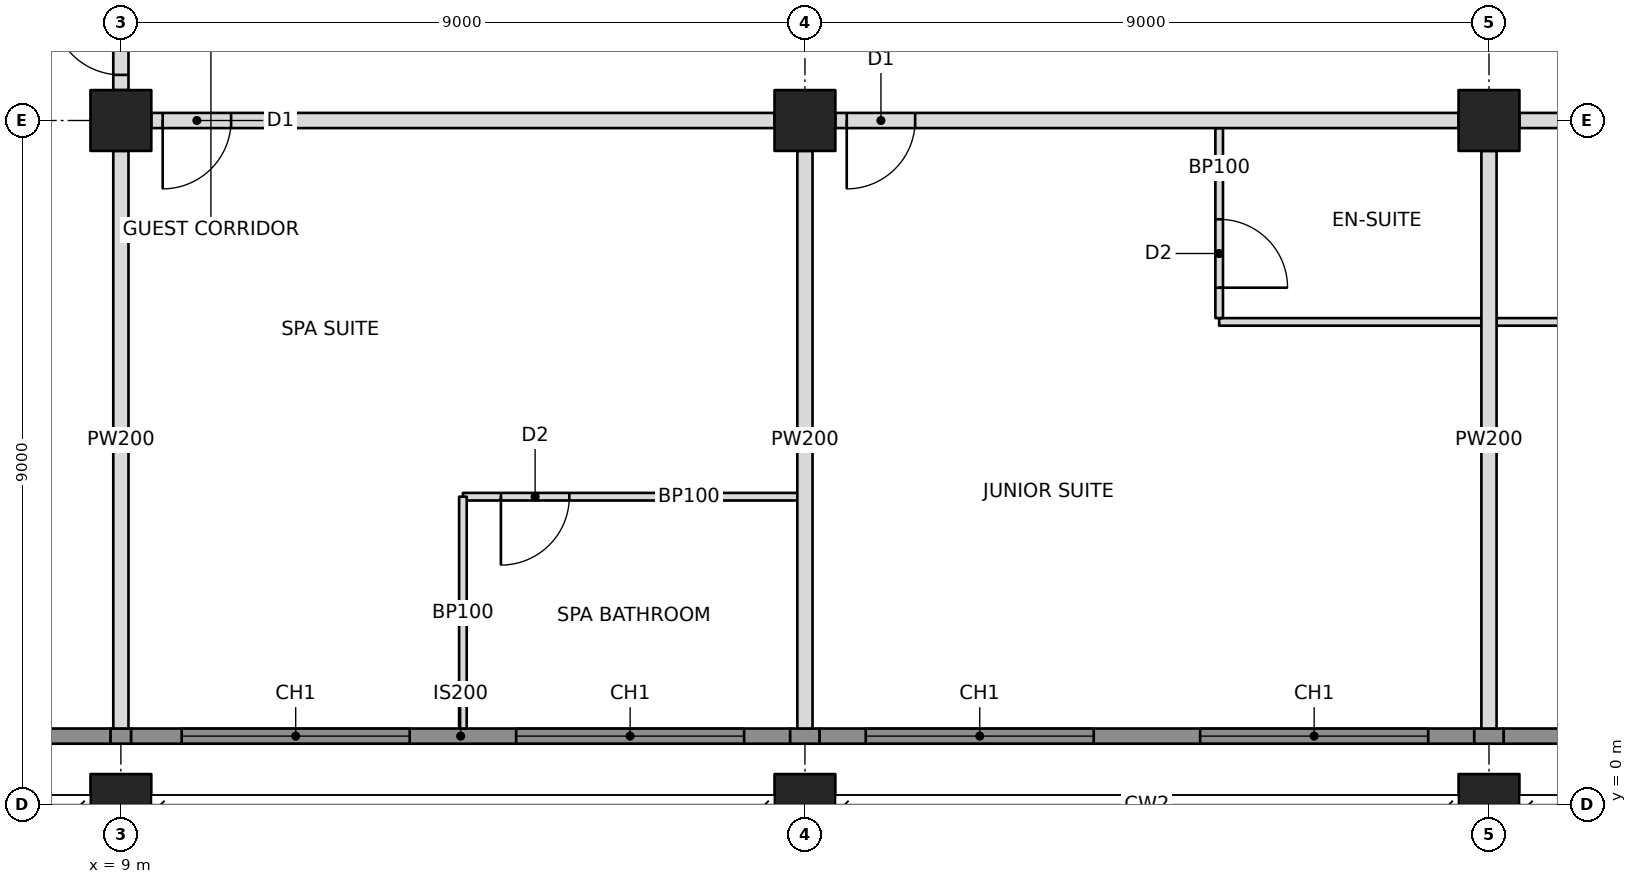
"""IFC4 building model, lengths in metres.
Left out: names, types, materials, properties, quantities, classifications, styles, units other than length and angle.
Written with IfcOpenShell. Run it as: python <this file> out.ifc"""

import sys

from ifc_helpers import new_model, si_unit, direction, frame, frame_2d, origin, origin_2d, place, context, subcontext, project, spatial, rectangle, hollow_rectangle, extrude, element, fill, save


model = new_model("IFC4")
c1 = context("Model", 3, precision=1e-05, world=origin(), true_north=direction((0.0, 1.0)))
c2 = subcontext(c1, "Body", "Model", "MODEL_VIEW")
j1 = project(units=[si_unit("LENGTHUNIT", "METRE"), si_unit("PLANEANGLEUNIT", "RADIAN")], contexts=[c1])
p1 = place(None, origin())
s1 = spatial("IfcSite", under=j1, at=p1, CompositionType="ELEMENT")
p2 = place(p1, origin())
s2 = spatial("IfcBuilding", under=s1, at=p2, CompositionType="ELEMENT")
p3 = place(p2, frame((0.0, 0.0, 244.6)))
s3 = spatial("IfcBuildingStorey", under=s2, at=p3, CompositionType="ELEMENT", Elevation=244.6)
p4 = place(p3, frame((9.0, 0.0, 0.0), z_axis=(0.0, 0.0, 1.0), x_axis=(1.0, 0.0, 0.0)))
e1 = element("IfcColumn", 1, at=p4, inside=s3, PredefinedType="COLUMN", context=c2, shape_type="SweptSolid", body=[
    extrude(hollow_rectangle(XDim=0.8, YDim=0.8, WallThickness=0.05, at=origin_2d()), origin(), (0.0, 0.0, 1.0), 3.6),
])
p5 = place(p3, frame((9.0, 9.0, 0.0), z_axis=(0.0, 0.0, 1.0), x_axis=(1.0, 0.0, 0.0)))
e2 = element("IfcColumn", 2, at=p5, inside=s3, PredefinedType="COLUMN", context=c2, shape_type="SweptSolid", body=[
    extrude(hollow_rectangle(XDim=0.8, YDim=0.8, WallThickness=0.04, at=origin_2d()), origin(), (0.0, 0.0, 1.0), 3.6),
])
p6 = place(p3, frame((18.0, 0.0, 0.0), z_axis=(0.0, 0.0, 1.0), x_axis=(1.0, 0.0, 0.0)))
e3 = element("IfcColumn", 3, at=p6, inside=s3, PredefinedType="COLUMN", context=c2, shape_type="SweptSolid", body=[
    extrude(hollow_rectangle(XDim=0.8, YDim=0.8, WallThickness=0.05, at=origin_2d()), origin(), (0.0, 0.0, 1.0), 3.6),
])
p7 = place(p3, frame((18.0, 9.0, 0.0), z_axis=(0.0, 0.0, 1.0), x_axis=(1.0, 0.0, 0.0)))
e4 = element("IfcColumn", 4, at=p7, inside=s3, PredefinedType="COLUMN", context=c2, shape_type="SweptSolid", body=[
    extrude(hollow_rectangle(XDim=0.8, YDim=0.8, WallThickness=0.04, at=origin_2d()), origin(), (0.0, 0.0, 1.0), 3.6),
])
p8 = place(p3, frame((27.0, 0.0, 0.0), z_axis=(0.0, 0.0, 1.0), x_axis=(1.0, 0.0, 0.0)))
e5 = element("IfcColumn", 5, at=p8, inside=s3, PredefinedType="COLUMN", context=c2, shape_type="SweptSolid", body=[
    extrude(hollow_rectangle(XDim=0.8, YDim=0.8, WallThickness=0.05, at=origin_2d()), origin(), (0.0, 0.0, 1.0), 3.6),
])
p9 = place(p3, frame((27.0, 9.0, 0.0), z_axis=(0.0, 0.0, 1.0), x_axis=(1.0, 0.0, 0.0)))
e6 = element("IfcColumn", 6, at=p9, inside=s3, PredefinedType="COLUMN", context=c2, shape_type="SweptSolid", body=[
    extrude(hollow_rectangle(XDim=0.8, YDim=0.8, WallThickness=0.04, at=origin_2d()), origin(), (0.0, 0.0, 1.0), 3.6),
])
p10 = place(p3, frame((3.0, 0.9, 0.0), z_axis=(0.0, 0.0, 1.0), x_axis=(1.0, 0.0, 0.0)))
e7 = element("IfcWall", 7, at=p10, inside=s3, PredefinedType="SOLIDWALL", context=c2, shape_type="SweptSolid", body=[
    extrude(rectangle(XDim=5.865, YDim=0.2, at=frame_2d((2.932, 0.0))), origin(), (0.0, 0.0, 1.0), 3.4),
])
p11 = place(p10, frame((1.45, 0.0, 0.6)))
e8 = element("IfcOpeningElement", 8, at=p11, cuts=e7, PredefinedType="OPENING", context=c2, shape_type="SweptSolid", body=[
    extrude(rectangle(XDim=3.0, YDim=2.2, at=frame_2d((1.5, 1.1))), frame((0.0, 0.11, 0.0), z_axis=(0.0, -1.0, 0.0), x_axis=(1.0, 0.0, 0.0)), (0.0, 0.0, 1.0), 0.22),
])
p12 = place(p3, frame((9.4, 9.0, 0.0), z_axis=(0.0, 0.0, 1.0), x_axis=(1.0, 0.0, 0.0)))
e9 = element("IfcWall", 9, at=p12, inside=s3, PredefinedType="PARTITIONING", context=c2, shape_type="SweptSolid", body=[
    extrude(rectangle(XDim=8.2, YDim=0.2, at=frame_2d((4.1, 0.0))), origin(), (0.0, 0.0, 1.0), 2.605),
])
p13 = place(p12, frame((0.15, 0.0, 0.0)))
e10 = element("IfcOpeningElement", 10, at=p13, cuts=e9, PredefinedType="OPENING", context=c2, shape_type="SweptSolid", body=[
    extrude(rectangle(XDim=0.9, YDim=2.1, at=frame_2d((0.45, 1.05))), frame((0.0, 0.11, 0.0), z_axis=(0.0, -1.0, 0.0), x_axis=(1.0, 0.0, 0.0)), (0.0, 0.0, 1.0), 0.22),
])
p14 = place(p3, frame((18.4, 9.0, 0.0), z_axis=(0.0, 0.0, 1.0), x_axis=(1.0, 0.0, 0.0)))
e11 = element("IfcWall", 11, at=p14, inside=s3, PredefinedType="PARTITIONING", context=c2, shape_type="SweptSolid", body=[
    extrude(rectangle(XDim=8.2, YDim=0.2, at=frame_2d((4.1, 0.0))), origin(), (0.0, 0.0, 1.0), 2.605),
])
p15 = place(p14, frame((0.15, 0.0, 0.0)))
e12 = element("IfcOpeningElement", 12, at=p15, cuts=e11, PredefinedType="OPENING", context=c2, shape_type="SweptSolid", body=[
    extrude(rectangle(XDim=0.9, YDim=2.1, at=frame_2d((0.45, 1.05))), frame((0.0, 0.11, 0.0), z_axis=(0.0, -1.0, 0.0), x_axis=(1.0, 0.0, 0.0)), (0.0, 0.0, 1.0), 0.22),
])
p16 = place(p3, frame((27.4, 9.0, 0.0), z_axis=(0.0, 0.0, 1.0), x_axis=(1.0, 0.0, 0.0)))
e13 = element("IfcWall", 13, at=p16, inside=s3, PredefinedType="PARTITIONING", context=c2, shape_type="SweptSolid", body=[
    extrude(rectangle(XDim=8.368, YDim=0.2, at=frame_2d((4.184, 0.0))), origin(), (0.0, 0.0, 1.0), 2.605),
])
p17 = place(p16, frame((7.25, 0.0, 0.0)))
e14 = element("IfcOpeningElement", 14, at=p17, cuts=e13, PredefinedType="OPENING", context=c2, shape_type="SweptSolid", body=[
    extrude(rectangle(XDim=0.9, YDim=2.1, at=frame_2d((0.45, 1.05))), frame((0.0, 0.11, 0.0), z_axis=(0.0, -1.0, 0.0), x_axis=(1.0, 0.0, 0.0)), (0.0, 0.0, 1.0), 0.22),
])
p18 = place(p3, frame((9.0, 8.6, 0.0), z_axis=(0.0, 0.0, 1.0), x_axis=(0.0, -1.0, 0.0)))
e15 = element("IfcWall", 15, at=p18, inside=s3, PredefinedType="PARTITIONING", context=c2, shape_type="SweptSolid", body=[
    extrude(rectangle(XDim=7.6, YDim=0.2, at=frame_2d((3.8, 0.0))), origin(), (0.0, 0.0, 1.0), 2.638),
])
for number, where, z_axis, x_axis in (
    (16, (18.0, 8.6, 0.0), (0.0, 0.0, 1.0), (0.0, -1.0, 0.0)),
    (17, (27.0, 8.6, 0.0), (0.0, 0.0, 1.0), (0.0, -1.0, 0.0)),
):
    element("IfcWall", number, at=place(p3, frame(where, z_axis=z_axis, x_axis=x_axis)), inside=s3, PredefinedType="PARTITIONING", context=c2, shape_type="SweptSolid", body=[
        extrude(rectangle(XDim=7.6, YDim=0.2, at=frame_2d((3.8, 0.0))), origin(), (0.0, 0.0, 1.0), 2.605),
    ])
p19 = place(p3, frame((13.5, 4.05, 0.0), z_axis=(0.0, 0.0, 1.0), x_axis=(1.0, 0.0, 0.0)))
e18 = element("IfcWall", 18, at=p19, inside=s3, PredefinedType="PARTITIONING", context=c2, shape_type="SweptSolid", body=[
    extrude(rectangle(XDim=4.4, YDim=0.1, at=frame_2d((2.2, 0.0))), origin(), (0.0, 0.0, 1.0), 2.604),
])
p20 = place(p19, frame((0.5, 0.0, 0.0)))
e19 = element("IfcOpeningElement", 19, at=p20, cuts=e18, PredefinedType="OPENING", context=c2, shape_type="SweptSolid", body=[
    extrude(rectangle(XDim=0.9, YDim=2.1, at=frame_2d((0.45, 1.05))), frame((0.0, 0.06, 0.0), z_axis=(0.0, -1.0, 0.0), x_axis=(1.0, 0.0, 0.0)), (0.0, 0.0, 1.0), 0.12),
])
p21 = place(p3, frame((13.5, 4.05, 0.0), z_axis=(0.0, 0.0, 1.0), x_axis=(0.0, -1.0, 0.0)))
e20 = element("IfcWall", 20, at=p21, inside=s3, PredefinedType="PARTITIONING", context=c2, shape_type="SweptSolid", body=[
    extrude(rectangle(XDim=3.05, YDim=0.1, at=frame_2d((1.525, 0.0))), origin(), (0.0, 0.0, 1.0), 3.4),
])
p22 = place(p3, frame((23.45, 6.35, 0.0), z_axis=(0.0, 0.0, 1.0), x_axis=(1.0, 0.0, 0.0)))
e21 = element("IfcWall", 21, at=p22, inside=s3, PredefinedType="PARTITIONING", context=c2, shape_type="SweptSolid", body=[
    extrude(rectangle(XDim=3.45, YDim=0.1, at=frame_2d((1.725, 0.0))), origin(), (0.0, 0.0, 1.0), 2.604),
])
p23 = place(p3, frame((23.45, 8.9, 0.0), z_axis=(0.0, 0.0, 1.0), x_axis=(0.0, -1.0, 0.0)))
e22 = element("IfcWall", 22, at=p23, inside=s3, PredefinedType="PARTITIONING", context=c2, shape_type="SweptSolid", body=[
    extrude(rectangle(XDim=2.5, YDim=0.1, at=frame_2d((1.25, 0.0))), origin(), (0.0, 0.0, 1.0), 2.604),
])
p24 = place(p23, frame((1.2, 0.0, 0.0)))
e23 = element("IfcOpeningElement", 23, at=p24, cuts=e22, PredefinedType="OPENING", context=c2, shape_type="SweptSolid", body=[
    extrude(rectangle(XDim=0.9, YDim=2.1, at=frame_2d((0.45, 1.05))), frame((0.0, 0.06, 0.0), z_axis=(0.0, -1.0, 0.0), x_axis=(1.0, 0.0, 0.0)), (0.0, 0.0, 1.0), 0.12),
])
p25 = place(p3, frame((27.1, 6.35, 0.0), z_axis=(0.0, 0.0, 1.0), x_axis=(1.0, 0.0, 0.0)))
e24 = element("IfcWall", 24, at=p25, inside=s3, PredefinedType="PARTITIONING", context=c2, shape_type="SweptSolid", body=[
    extrude(rectangle(XDim=3.45, YDim=0.1, at=frame_2d((1.725, 0.0))), origin(), (0.0, 0.0, 1.0), 2.604),
])
p26 = place(p3, frame((9.0, 9.4, 0.0), z_axis=(0.0, 0.0, 1.0), x_axis=(0.0, 1.0, 0.0)))
e25 = element("IfcWall", 25, at=p26, inside=s3, PredefinedType="PARTITIONING", context=c2, shape_type="SweptSolid", body=[
    extrude(rectangle(XDim=1.3, YDim=0.2, at=frame_2d((0.65, 0.0))), origin(), (0.0, 0.0, 1.0), 2.605),
])
p27 = place(p26, frame((0.2, 0.0, 0.0)))
e26 = element("IfcOpeningElement", 26, at=p27, cuts=e25, PredefinedType="OPENING", context=c2, shape_type="SweptSolid", body=[
    extrude(rectangle(XDim=0.9, YDim=2.1, at=frame_2d((0.45, 1.05))), frame((0.0, 0.11, 0.0), z_axis=(0.0, -1.0, 0.0), x_axis=(1.0, 0.0, 0.0)), (0.0, 0.0, 1.0), 0.22),
])
p28 = place(p3, frame((8.865, 0.9, 0.0), z_axis=(0.0, 0.0, 1.0), x_axis=(1.0, 0.0, 0.0)))
e27 = element("IfcWall", 27, at=p28, inside=s3, PredefinedType="SOLIDWALL", context=c2, shape_type="SweptSolid", body=[
    extrude(rectangle(XDim=0.271, YDim=0.2, at=frame_2d((0.135, 0.0))), origin(), (0.0, 0.0, 1.0), 2.638),
])
p29 = place(p3, frame((9.135, 0.9, 0.0), z_axis=(0.0, 0.0, 1.0), x_axis=(1.0, 0.0, 0.0)))
e28 = element("IfcWall", 28, at=p29, inside=s3, PredefinedType="SOLIDWALL", context=c2, shape_type="SweptSolid", body=[
    extrude(rectangle(XDim=8.671, YDim=0.2, at=frame_2d((4.335, 0.0))), origin(), (0.0, 0.0, 1.0), 3.4),
])
p30 = place(p29, frame((0.665, 0.0, 0.6)))
e29 = element("IfcOpeningElement", 29, at=p30, cuts=e28, PredefinedType="OPENING", context=c2, shape_type="SweptSolid", body=[
    extrude(rectangle(XDim=3.0, YDim=2.2, at=frame_2d((1.5, 1.1))), frame((0.0, 0.11, 0.0), z_axis=(0.0, -1.0, 0.0), x_axis=(1.0, 0.0, 0.0)), (0.0, 0.0, 1.0), 0.22),
])
p31 = place(p29, frame((5.065, 0.0, 0.6)))
e30 = element("IfcOpeningElement", 30, at=p31, cuts=e28, PredefinedType="OPENING", context=c2, shape_type="SweptSolid", body=[
    extrude(rectangle(XDim=3.0, YDim=2.2, at=frame_2d((1.5, 1.1))), frame((0.0, 0.11, 0.0), z_axis=(0.0, -1.0, 0.0), x_axis=(1.0, 0.0, 0.0)), (0.0, 0.0, 1.0), 0.22),
])
p32 = place(p3, frame((17.806, 0.9, 0.0), z_axis=(0.0, 0.0, 1.0), x_axis=(1.0, 0.0, 0.0)))
e31 = element("IfcWall", 31, at=p32, inside=s3, PredefinedType="SOLIDWALL", context=c2, shape_type="SweptSolid", body=[
    extrude(rectangle(XDim=0.388, YDim=0.2, at=frame_2d((0.194, 0.0))), origin(), (0.0, 0.0, 1.0), 2.604),
])
p33 = place(p3, frame((18.194, 0.9, 0.0), z_axis=(0.0, 0.0, 1.0), x_axis=(1.0, 0.0, 0.0)))
e32 = element("IfcWall", 32, at=p33, inside=s3, PredefinedType="SOLIDWALL", context=c2, shape_type="SweptSolid", body=[
    extrude(rectangle(XDim=8.612, YDim=0.2, at=frame_2d((4.306, 0.0))), origin(), (0.0, 0.0, 1.0), 3.4),
])
p34 = place(p33, frame((0.606, 0.0, 0.6)))
e33 = element("IfcOpeningElement", 33, at=p34, cuts=e32, PredefinedType="OPENING", context=c2, shape_type="SweptSolid", body=[
    extrude(rectangle(XDim=3.0, YDim=2.2, at=frame_2d((1.5, 1.1))), frame((0.0, 0.11, 0.0), z_axis=(0.0, -1.0, 0.0), x_axis=(1.0, 0.0, 0.0)), (0.0, 0.0, 1.0), 0.22),
])
p35 = place(p33, frame((5.006, 0.0, 0.6)))
e34 = element("IfcOpeningElement", 34, at=p35, cuts=e32, PredefinedType="OPENING", context=c2, shape_type="SweptSolid", body=[
    extrude(rectangle(XDim=3.0, YDim=2.2, at=frame_2d((1.5, 1.1))), frame((0.0, 0.11, 0.0), z_axis=(0.0, -1.0, 0.0), x_axis=(1.0, 0.0, 0.0)), (0.0, 0.0, 1.0), 0.22),
])
p36 = place(p3, frame((26.806, 0.9, 0.0), z_axis=(0.0, 0.0, 1.0), x_axis=(1.0, 0.0, 0.0)))
e35 = element("IfcWall", 35, at=p36, inside=s3, PredefinedType="SOLIDWALL", context=c2, shape_type="SweptSolid", body=[
    extrude(rectangle(XDim=0.388, YDim=0.2, at=frame_2d((0.194, 0.0))), origin(), (0.0, 0.0, 1.0), 2.604),
])
p37 = place(p3, frame((27.194, 0.9, 0.0), z_axis=(0.0, 0.0, 1.0), x_axis=(1.0, 0.0, 0.0)))
e36 = element("IfcWall", 36, at=p37, inside=s3, PredefinedType="SOLIDWALL", context=c2, shape_type="SweptSolid", body=[
    extrude(rectangle(XDim=5.806, YDim=0.2, at=frame_2d((2.903, 0.0))), origin(), (0.0, 0.0, 1.0), 3.4),
])
p38 = place(p37, frame((1.356, 0.0, 0.6)))
e37 = element("IfcOpeningElement", 37, at=p38, cuts=e36, PredefinedType="OPENING", context=c2, shape_type="SweptSolid", body=[
    extrude(rectangle(XDim=3.0, YDim=2.2, at=frame_2d((1.5, 1.1))), frame((0.0, 0.11, 0.0), z_axis=(0.0, -1.0, 0.0), x_axis=(1.0, 0.0, 0.0)), (0.0, 0.0, 1.0), 0.22),
])
p39 = place(p30, origin())
e38 = element("IfcWindow", 38, at=p39, inside=s3, PartitioningType="TRIPLE_PANEL_VERTICAL", PredefinedType="WINDOW", context=c2, shape_type="SweptSolid", body=[
    extrude(rectangle(XDim=3.0, YDim=2.2, at=frame_2d((1.5, 1.1))), frame((0.0, 0.03, 0.0), z_axis=(0.0, -1.0, 0.0), x_axis=(1.0, 0.0, 0.0)), (0.0, 0.0, 1.0), 0.06),
])
fill(e29, e38)
p40 = place(p31, origin())
e39 = element("IfcWindow", 39, at=p40, inside=s3, PartitioningType="TRIPLE_PANEL_VERTICAL", PredefinedType="WINDOW", context=c2, shape_type="SweptSolid", body=[
    extrude(rectangle(XDim=3.0, YDim=2.2, at=frame_2d((1.5, 1.1))), frame((0.0, 0.03, 0.0), z_axis=(0.0, -1.0, 0.0), x_axis=(1.0, 0.0, 0.0)), (0.0, 0.0, 1.0), 0.06),
])
fill(e30, e39)
p41 = place(p34, origin())
e40 = element("IfcWindow", 40, at=p41, inside=s3, PartitioningType="TRIPLE_PANEL_VERTICAL", PredefinedType="WINDOW", context=c2, shape_type="SweptSolid", body=[
    extrude(rectangle(XDim=3.0, YDim=2.2, at=frame_2d((1.5, 1.1))), frame((0.0, 0.03, 0.0), z_axis=(0.0, -1.0, 0.0), x_axis=(1.0, 0.0, 0.0)), (0.0, 0.0, 1.0), 0.06),
])
fill(e33, e40)
p42 = place(p35, origin())
e41 = element("IfcWindow", 41, at=p42, inside=s3, PartitioningType="TRIPLE_PANEL_VERTICAL", PredefinedType="WINDOW", context=c2, shape_type="SweptSolid", body=[
    extrude(rectangle(XDim=3.0, YDim=2.2, at=frame_2d((1.5, 1.1))), frame((0.0, 0.03, 0.0), z_axis=(0.0, -1.0, 0.0), x_axis=(1.0, 0.0, 0.0)), (0.0, 0.0, 1.0), 0.06),
])
fill(e34, e41)
p43 = place(p20, frame((0.9, 0.0, 0.0), z_axis=(0.0, 0.0, 1.0), x_axis=(-1.0, 0.0, 0.0)))
e42 = element("IfcDoor", 42, at=p43, inside=s3, OperationType="SINGLE_SWING_RIGHT", PredefinedType="DOOR", context=c2, shape_type="SweptSolid", body=[
    extrude(rectangle(XDim=0.9, YDim=2.1, at=frame_2d((0.45, 1.05))), frame((0.0, 0.025, 0.0), z_axis=(0.0, -1.0, 0.0), x_axis=(1.0, 0.0, 0.0)), (0.0, 0.0, 1.0), 0.05),
])
fill(e19, e42)
p44 = place(p13, frame((0.9, 0.0, 0.0), z_axis=(0.0, 0.0, 1.0), x_axis=(-1.0, 0.0, 0.0)))
e43 = element("IfcDoor", 43, at=p44, inside=s3, OperationType="SINGLE_SWING_RIGHT", PredefinedType="DOOR", context=c2, shape_type="SweptSolid", body=[
    extrude(rectangle(XDim=0.9, YDim=2.1, at=frame_2d((0.45, 1.05))), frame((0.0, 0.025, 0.0), z_axis=(0.0, -1.0, 0.0), x_axis=(1.0, 0.0, 0.0)), (0.0, 0.0, 1.0), 0.05),
])
fill(e10, e43)
p45 = place(p24, origin())
e44 = element("IfcDoor", 44, at=p45, inside=s3, OperationType="SINGLE_SWING_RIGHT", PredefinedType="DOOR", context=c2, shape_type="SweptSolid", body=[
    extrude(rectangle(XDim=0.9, YDim=2.1, at=frame_2d((0.45, 1.05))), frame((0.0, 0.025, 0.0), z_axis=(0.0, -1.0, 0.0), x_axis=(1.0, 0.0, 0.0)), (0.0, 0.0, 1.0), 0.05),
])
fill(e23, e44)
p46 = place(p15, frame((0.9, 0.0, 0.0), z_axis=(0.0, 0.0, 1.0), x_axis=(-1.0, 0.0, 0.0)))
e45 = element("IfcDoor", 45, at=p46, inside=s3, OperationType="SINGLE_SWING_RIGHT", PredefinedType="DOOR", context=c2, shape_type="SweptSolid", body=[
    extrude(rectangle(XDim=0.9, YDim=2.1, at=frame_2d((0.45, 1.05))), frame((0.0, 0.025, 0.0), z_axis=(0.0, -1.0, 0.0), x_axis=(1.0, 0.0, 0.0)), (0.0, 0.0, 1.0), 0.05),
])
fill(e12, e45)
p47 = place(p27, origin())
e46 = element("IfcDoor", 46, at=p47, inside=s3, OperationType="SINGLE_SWING_RIGHT", PredefinedType="DOOR", context=c2, shape_type="SweptSolid", body=[
    extrude(rectangle(XDim=0.9, YDim=2.1, at=frame_2d((0.45, 1.05))), frame((0.0, 0.025, 0.0), z_axis=(0.0, -1.0, 0.0), x_axis=(1.0, 0.0, 0.0)), (0.0, 0.0, 1.0), 0.05),
])
fill(e26, e46)
save(model, sys.argv[1])
